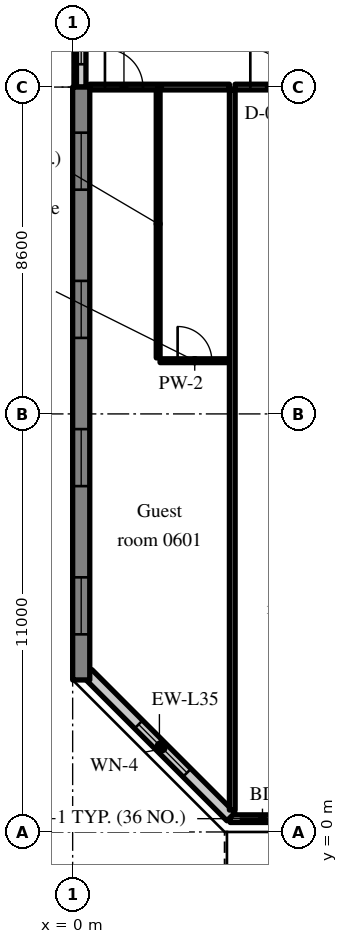
"""IFC4 building model, lengths in metres.
Left out: names, types, materials, properties, quantities, classifications, styles, units other than length and angle.
Written with IfcOpenShell. Run it as: python <this file> out.ifc"""

import sys

from ifc_helpers import new_model, si_unit, direction, frame, frame_2d, origin, place, context, subcontext, project, spatial, rectangle, extrude, source, transform, mapped, element, fill, save


model = new_model("IFC4")
c1 = context("Model", 3, precision=1e-05, world=origin(), true_north=direction((0.0, 1.0)))
c2 = subcontext(c1, "Body", "Model", "MODEL_VIEW")
j1 = project(units=[si_unit("LENGTHUNIT", "METRE"), si_unit("PLANEANGLEUNIT", "RADIAN")], contexts=[c1])
p1 = place(None, origin())
s1 = spatial("IfcSite", under=j1, at=p1, CompositionType="ELEMENT")
p2 = place(p1, origin())
s2 = spatial("IfcBuilding", under=s1, at=p2, CompositionType="ELEMENT")
p3 = place(p2, frame((0.0, 0.0, 31.6)))
s3 = spatial("IfcBuildingStorey", under=s2, at=p3, CompositionType="ELEMENT", Elevation=31.6)
m1 = source(origin(), c2, "Body", "SweptSolid", [
    extrude(rectangle(XDim=15.6, YDim=0.45, at=frame_2d((7.8, 0.0))), origin(), (0.0, 0.0, 1.0), 3.52),
])
p4 = place(p3, frame((0.225, 4.0, 0.0), z_axis=(0.0, 0.0, 1.0), x_axis=(0.0, 1.0, 0.0)))
e1 = element("IfcWall", 1, at=p4, inside=s3, PredefinedType="SHEAR", context=c2, shape_type="MappedRepresentation", body=[
    mapped(m1, transform((0.0, 0.0, 0.0), scale=1.0)),
])
m2 = source(origin(), c2, "Body", "SweptSolid", [
    extrude(rectangle(XDim=1.5, YDim=1.5, at=frame_2d((0.75, 0.75))), frame((0.0, 0.235, 0.0), z_axis=(0.0, -1.0, 0.0), x_axis=(1.0, 0.0, 0.0)), (0.0, 0.0, 1.0), 0.47),
])
p5 = place(p4, frame((1.2, 0.0, 0.9)))
e2 = element("IfcOpeningElement", 2, at=p5, cuts=e1, PredefinedType="OPENING", context=c2, shape_type="MappedRepresentation", body=[
    mapped(m2, transform((0.0, 0.0, 0.0), scale=1.0)),
])
p6 = place(p4, frame((5.1, 0.0, 0.9)))
e3 = element("IfcOpeningElement", 3, at=p6, cuts=e1, PredefinedType="OPENING", context=c2, shape_type="MappedRepresentation", body=[
    mapped(m2, transform((0.0, 0.0, 0.0), scale=1.0)),
])
p7 = place(p4, frame((9.0, 0.0, 0.9)))
e4 = element("IfcOpeningElement", 4, at=p7, cuts=e1, PredefinedType="OPENING", context=c2, shape_type="MappedRepresentation", body=[
    mapped(m2, transform((0.0, 0.0, 0.0), scale=1.0)),
])
p8 = place(p4, frame((12.9, 0.0, 0.9)))
e5 = element("IfcOpeningElement", 5, at=p8, cuts=e1, PredefinedType="OPENING", context=c2, shape_type="MappedRepresentation", body=[
    mapped(m2, transform((0.0, 0.0, 0.0), scale=1.0)),
])
m3 = source(origin(), c2, "Body", "SweptSolid", [
    extrude(rectangle(XDim=4.03, YDim=0.2, at=frame_2d((2.015, 0.0))), origin(), (0.0, 0.0, 1.0), 2.77),
])
p9 = place(p3, frame((4.145, 0.35, 0.0), z_axis=(0.0, 0.0, 1.0), x_axis=(1.0, 0.0, 0.0)))
e6 = element("IfcWall", 6, at=p9, inside=s3, PredefinedType="SOLIDWALL", context=c2, shape_type="MappedRepresentation", body=[
    mapped(m3, transform((0.0, 0.0, 0.0), scale=1.0)),
])
m4 = source(origin(), c2, "Body", "SweptSolid", [
    extrude(rectangle(XDim=1.2, YDim=2.4, at=frame_2d((0.6, 1.2))), frame((0.0, 0.11, 0.0), z_axis=(0.0, -1.0, 0.0), x_axis=(1.0, 0.0, 0.0)), (0.0, 0.0, 1.0), 0.22),
])
p10 = place(p9, frame((0.25, 0.0, 0.0)))
e7 = element("IfcOpeningElement", 7, at=p10, cuts=e6, PredefinedType="OPENING", context=c2, shape_type="MappedRepresentation", body=[
    mapped(m4, transform((0.0, 0.0, 0.0), scale=1.0)),
])
m5 = source(origin(), c2, "Body", "SweptSolid", [
    extrude(rectangle(XDim=1.5, YDim=1.5, at=frame_2d((0.75, 0.75))), frame((0.0, 0.11, 0.0), z_axis=(0.0, -1.0, 0.0), x_axis=(1.0, 0.0, 0.0)), (0.0, 0.0, 1.0), 0.22),
])
p11 = place(p9, frame((2.28, 0.0, 0.9)))
e8 = element("IfcOpeningElement", 8, at=p11, cuts=e6, PredefinedType="OPENING", context=c2, shape_type="MappedRepresentation", body=[
    mapped(m5, transform((0.0, 0.0, 0.0), scale=1.0)),
])
m6 = source(origin(), c2, "Body", "SweptSolid", [
    extrude(rectangle(XDim=5.326, YDim=0.3, at=frame_2d((2.663, 0.0))), origin(), (0.0, 0.0, 1.0), 3.52),
])
p12 = place(p3, frame((0.4, 4.166, 0.0), z_axis=(0.0, 0.0, 1.0), x_axis=(0.707106781187, -0.707106781187, 0.0)))
e9 = element("IfcWall", 9, at=p12, inside=s3, PredefinedType="SOLIDWALL", context=c2, shape_type="MappedRepresentation", body=[
    mapped(m6, transform((0.0, 0.0, 0.0), scale=1.0)),
])
m7 = source(origin(), c2, "Body", "SweptSolid", [
    extrude(rectangle(XDim=1.8, YDim=1.5, at=frame_2d((0.9, 0.75))), frame((0.0, 0.16, 0.0), z_axis=(0.0, -1.0, 0.0), x_axis=(1.0, 0.0, 0.0)), (0.0, 0.0, 1.0), 0.32),
])
p13 = place(p12, frame((1.889, 0.0, 0.9)))
e10 = element("IfcOpeningElement", 10, at=p13, cuts=e9, PredefinedType="OPENING", context=c2, shape_type="MappedRepresentation", body=[
    mapped(m7, transform((0.0, 0.0, 0.0), scale=1.0)),
])
m8 = source(origin(), c2, "Body", "SweptSolid", [
    extrude(rectangle(XDim=2.4, YDim=0.25, at=frame_2d((1.2, 0.0))), origin(), (0.0, 0.0, 1.0), 2.62),
])
p14 = place(p3, frame((0.225, 19.6, 0.0), z_axis=(0.0, 0.0, 1.0), x_axis=(0.0, 1.0, 0.0)))
e11 = element("IfcWall", 11, at=p14, inside=s3, PredefinedType="SOLIDWALL", context=c2, shape_type="MappedRepresentation", body=[
    mapped(m8, transform((0.0, 0.0, 0.0), scale=1.0)),
])
m9 = source(origin(), c2, "Body", "SweptSolid", [
    extrude(rectangle(XDim=1.2, YDim=1.5, at=frame_2d((0.6, 0.75))), frame((0.0, 0.135, 0.0), z_axis=(0.0, -1.0, 0.0), x_axis=(1.0, 0.0, 0.0)), (0.0, 0.0, 1.0), 0.27),
])
p15 = place(p14, frame((0.6, 0.0, 0.9)))
e12 = element("IfcOpeningElement", 12, at=p15, cuts=e11, PredefinedType="OPENING", context=c2, shape_type="MappedRepresentation", body=[
    mapped(m9, transform((0.0, 0.0, 0.0), scale=1.0)),
])
m10 = source(origin(), c2, "Body", "SweptSolid", [
    extrude(rectangle(XDim=7.05, YDim=0.1, at=frame_2d((3.525, 0.0))), origin(), (0.0, 0.0, 1.0), 3.52),
])
p16 = place(p3, frame((2.25, 12.475, 0.0), z_axis=(0.0, 0.0, 1.0), x_axis=(0.0, 1.0, 0.0)))
e13 = element("IfcWall", 13, at=p16, inside=s3, PredefinedType="PARTITIONING", context=c2, shape_type="MappedRepresentation", body=[
    mapped(m10, transform((0.0, 0.0, 0.0), scale=1.0)),
])
m11 = source(origin(), c2, "Body", "SweptSolid", [
    extrude(rectangle(XDim=1.825, YDim=0.1, at=frame_2d((0.913, 0.0))), origin(), (0.0, 0.0, 1.0), 3.52),
])
p17 = place(p3, frame((2.3, 12.4, 0.0), z_axis=(0.0, 0.0, 1.0), x_axis=(1.0, 0.0, 0.0)))
e14 = element("IfcWall", 14, at=p17, inside=s3, PredefinedType="PARTITIONING", context=c2, shape_type="MappedRepresentation", body=[
    mapped(m11, transform((0.0, 0.0, 0.0), scale=1.0)),
])
m12 = source(origin(), c2, "Body", "SweptSolid", [
    extrude(rectangle(XDim=0.9, YDim=2.1, at=frame_2d((0.45, 1.05))), frame((0.0, 0.06, 0.0), z_axis=(0.0, -1.0, 0.0), x_axis=(1.0, 0.0, 0.0)), (0.0, 0.0, 1.0), 0.12),
])
p18 = place(p17, frame((0.462, 0.0, 0.0)))
e15 = element("IfcOpeningElement", 15, at=p18, cuts=e14, PredefinedType="OPENING", context=c2, shape_type="MappedRepresentation", body=[
    mapped(m12, transform((0.0, 0.0, 0.0), scale=1.0)),
])
m13 = source(origin(), c2, "Body", "SweptSolid", [
    extrude(rectangle(XDim=3.675, YDim=0.15, at=frame_2d((1.837, 0.0))), origin(), (0.0, 0.0, 1.0), 2.82),
])
p19 = place(p3, frame((0.45, 19.6, 0.0), z_axis=(0.0, 0.0, 1.0), x_axis=(1.0, 0.0, 0.0)))
e16 = element("IfcWall", 16, at=p19, inside=s3, PredefinedType="PARTITIONING", context=c2, shape_type="MappedRepresentation", body=[
    mapped(m13, transform((0.0, 0.0, 0.0), scale=1.0)),
])
m14 = source(origin(), c2, "Body", "SweptSolid", [
    extrude(rectangle(XDim=1.0, YDim=2.1, at=frame_2d((0.5, 1.05))), frame((0.0, 0.085, 0.0), z_axis=(0.0, -1.0, 0.0), x_axis=(1.0, 0.0, 0.0)), (0.0, 0.0, 1.0), 0.17),
])
p20 = place(p19, frame((0.4, 0.0, 0.0)))
e17 = element("IfcOpeningElement", 17, at=p20, cuts=e16, PredefinedType="OPENING", context=c2, shape_type="MappedRepresentation", body=[
    mapped(m14, transform((0.0, 0.0, 0.0), scale=1.0)),
])
m15 = source(origin(), c2, "Body", "SweptSolid", [
    extrude(rectangle(XDim=3.9, YDim=0.15, at=frame_2d((1.95, 0.0))), origin(), (0.0, 0.0, 1.0), 2.82),
])
p21 = place(p3, frame((4.275, 19.6, 0.0), z_axis=(0.0, 0.0, 1.0), x_axis=(1.0, 0.0, 0.0)))
e18 = element("IfcWall", 18, at=p21, inside=s3, PredefinedType="PARTITIONING", context=c2, shape_type="MappedRepresentation", body=[
    mapped(m15, transform((0.0, 0.0, 0.0), scale=1.0)),
])
p22 = place(p21, frame((0.4, 0.0, 0.0)))
e19 = element("IfcOpeningElement", 19, at=p22, cuts=e18, PredefinedType="OPENING", context=c2, shape_type="MappedRepresentation", body=[
    mapped(m14, transform((0.0, 0.0, 0.0), scale=1.0)),
])
m16 = source(origin(), c2, "Body", "SweptSolid", [
    extrude(rectangle(XDim=18.947, YDim=0.15, at=frame_2d((9.474, 0.0))), origin(), (0.0, 0.0, 1.0), 3.52),
])
p23 = place(p3, frame((4.2, 0.578, 0.0), z_axis=(0.0, 0.0, 1.0), x_axis=(0.0, 1.0, 0.0)))
e20 = element("IfcWall", 20, at=p23, inside=s3, PredefinedType="PARTITIONING", context=c2, shape_type="MappedRepresentation", body=[
    mapped(m16, transform((0.0, 0.0, 0.0), scale=1.0)),
])
m17 = source(origin(), c2, "Body", "SweptSolid", [
    extrude(rectangle(XDim=1.2, YDim=2.4, at=frame_2d((0.6, 1.2))), frame((0.0, 0.025, 0.0), z_axis=(0.0, -1.0, 0.0), x_axis=(1.0, 0.0, 0.0)), (0.0, 0.0, 1.0), 0.05),
])
p24 = place(p10, origin())
e21 = element("IfcDoor", 21, at=p24, inside=s3, OperationType="SLIDING_TO_LEFT", PredefinedType="DOOR", context=c2, shape_type="MappedRepresentation", body=[
    mapped(m17, transform((0.0, 0.0, 0.0), scale=1.0)),
])
fill(e7, e21)
m18 = source(origin(), c2, "Body", "SweptSolid", [
    extrude(rectangle(XDim=1.8, YDim=1.5, at=frame_2d((0.9, 0.75))), frame((0.0, 0.03, 0.0), z_axis=(0.0, -1.0, 0.0), x_axis=(1.0, 0.0, 0.0)), (0.0, 0.0, 1.0), 0.06),
])
p25 = place(p13, origin())
e22 = element("IfcWindow", 22, at=p25, inside=s3, PartitioningType="SINGLE_PANEL", PredefinedType="WINDOW", context=c2, shape_type="MappedRepresentation", body=[
    mapped(m18, transform((0.0, 0.0, 0.0), scale=1.0)),
])
fill(e10, e22)
m19 = source(origin(), c2, "Body", "SweptSolid", [
    extrude(rectangle(XDim=1.5, YDim=1.5, at=frame_2d((0.75, 0.75))), frame((0.0, 0.03, 0.0), z_axis=(0.0, -1.0, 0.0), x_axis=(1.0, 0.0, 0.0)), (0.0, 0.0, 1.0), 0.06),
])
p26 = place(p5, origin())
e23 = element("IfcWindow", 23, at=p26, inside=s3, PartitioningType="SINGLE_PANEL", PredefinedType="WINDOW", context=c2, shape_type="MappedRepresentation", body=[
    mapped(m19, transform((0.0, 0.0, 0.0), scale=1.0)),
])
fill(e2, e23)
p27 = place(p6, origin())
e24 = element("IfcWindow", 24, at=p27, inside=s3, PartitioningType="SINGLE_PANEL", PredefinedType="WINDOW", context=c2, shape_type="MappedRepresentation", body=[
    mapped(m19, transform((0.0, 0.0, 0.0), scale=1.0)),
])
fill(e3, e24)
p28 = place(p7, origin())
e25 = element("IfcWindow", 25, at=p28, inside=s3, PartitioningType="SINGLE_PANEL", PredefinedType="WINDOW", context=c2, shape_type="MappedRepresentation", body=[
    mapped(m19, transform((0.0, 0.0, 0.0), scale=1.0)),
])
fill(e4, e25)
p29 = place(p8, origin())
e26 = element("IfcWindow", 26, at=p29, inside=s3, PartitioningType="SINGLE_PANEL", PredefinedType="WINDOW", context=c2, shape_type="MappedRepresentation", body=[
    mapped(m19, transform((0.0, 0.0, 0.0), scale=1.0)),
])
fill(e5, e26)
m20 = source(origin(), c2, "Body", "SweptSolid", [
    extrude(rectangle(XDim=1.2, YDim=1.5, at=frame_2d((0.6, 0.75))), frame((0.0, 0.03, 0.0), z_axis=(0.0, -1.0, 0.0), x_axis=(1.0, 0.0, 0.0)), (0.0, 0.0, 1.0), 0.06),
])
p30 = place(p15, origin())
e27 = element("IfcWindow", 27, at=p30, inside=s3, PartitioningType="SINGLE_PANEL", PredefinedType="WINDOW", context=c2, shape_type="MappedRepresentation", body=[
    mapped(m20, transform((0.0, 0.0, 0.0), scale=1.0)),
])
fill(e12, e27)
m21 = source(origin(), c2, "Body", "SweptSolid", [
    extrude(rectangle(XDim=0.9, YDim=2.1, at=frame_2d((0.45, 1.05))), frame((0.0, 0.025, 0.0), z_axis=(0.0, -1.0, 0.0), x_axis=(1.0, 0.0, 0.0)), (0.0, 0.0, 1.0), 0.05),
])
p31 = place(p18, origin())
e28 = element("IfcDoor", 28, at=p31, inside=s3, OperationType="SINGLE_SWING_LEFT", PredefinedType="DOOR", context=c2, shape_type="MappedRepresentation", body=[
    mapped(m21, transform((0.0, 0.0, 0.0), scale=1.0)),
])
fill(e15, e28)
m22 = source(origin(), c2, "Body", "SweptSolid", [
    extrude(rectangle(XDim=1.0, YDim=2.1, at=frame_2d((0.5, 1.05))), frame((0.0, 0.025, 0.0), z_axis=(0.0, -1.0, 0.0), x_axis=(1.0, 0.0, 0.0)), (0.0, 0.0, 1.0), 0.05),
])
p32 = place(p20, origin())
e29 = element("IfcDoor", 29, at=p32, inside=s3, OperationType="SINGLE_SWING_LEFT", PredefinedType="DOOR", context=c2, shape_type="MappedRepresentation", body=[
    mapped(m22, transform((0.0, 0.0, 0.0), scale=1.0)),
])
fill(e17, e29)
p33 = place(p22, origin())
e30 = element("IfcDoor", 30, at=p33, inside=s3, OperationType="SINGLE_SWING_LEFT", PredefinedType="DOOR", context=c2, shape_type="MappedRepresentation", body=[
    mapped(m22, transform((0.0, 0.0, 0.0), scale=1.0)),
])
fill(e19, e30)
save(model, sys.argv[1])
